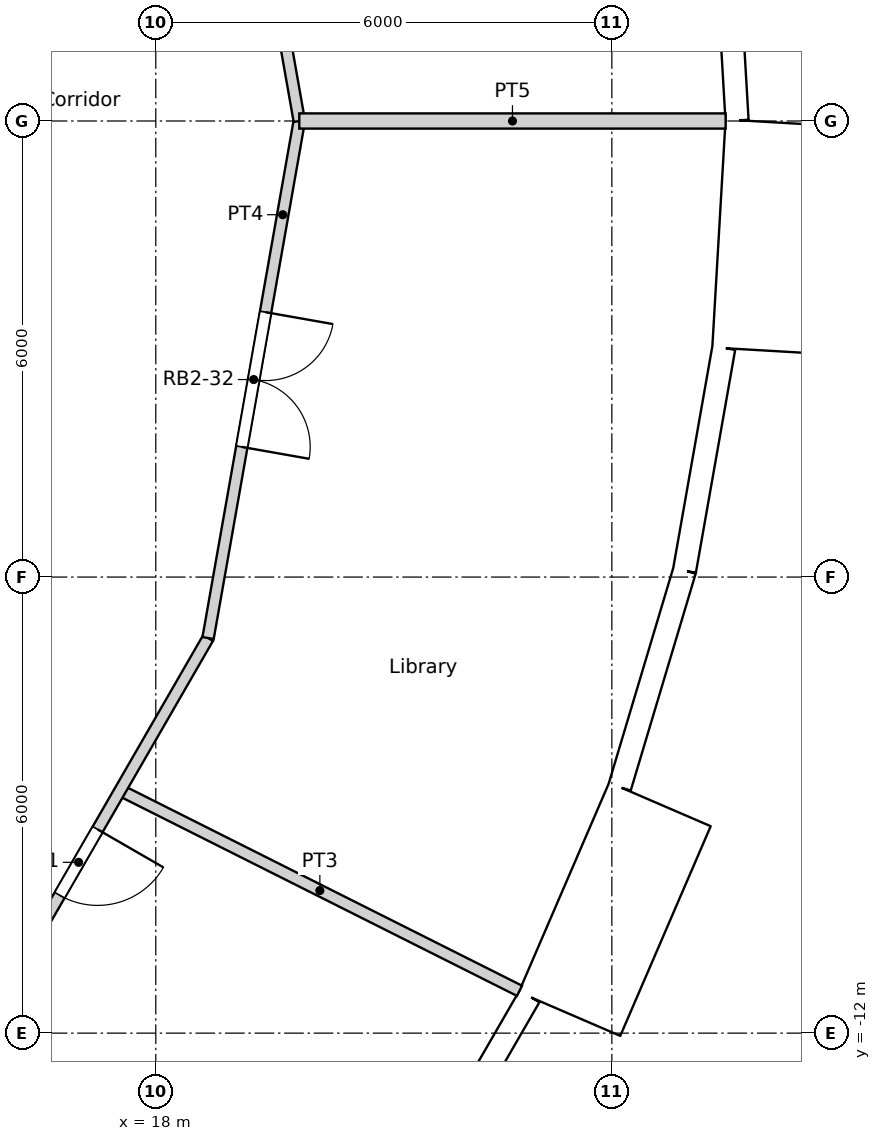
"""IFC4 building model, lengths in metres.
Left out: names, types, materials, properties, quantities, classifications, styles, units other than length and angle.
Written with IfcOpenShell. Run it as: python <this file> out.ifc"""

import sys

from ifc_helpers import new_model, si_unit, direction, frame, frame_2d, origin, origin_2d, place, context, subcontext, project, spatial, rectangle, circle, extrude, element, fill, save


model = new_model("IFC4")
c1 = context("Model", 3, precision=1e-05, world=origin(), true_north=direction((0.0, 1.0)))
c2 = subcontext(c1, "Body", "Model", "MODEL_VIEW")
j1 = project(units=[si_unit("LENGTHUNIT", "METRE"), si_unit("PLANEANGLEUNIT", "RADIAN")], contexts=[c1])
p1 = place(None, origin())
s1 = spatial("IfcSite", under=j1, at=p1, CompositionType="ELEMENT")
p2 = place(p1, origin())
s2 = spatial("IfcBuilding", under=s1, at=p2, CompositionType="ELEMENT")
p3 = place(p2, frame((0.0, 0.0, 136.8)))
s3 = spatial("IfcBuildingStorey", under=s2, at=p3, CompositionType="ELEMENT", Elevation=136.8)
for number, where, z_axis, x_axis in (
    (1, (24.548, 0.0, 0.0), (0.0, 0.0, 1.0), (1.0, 0.0, 0.0)),
    (2, (21.937, -11.017, 0.0), (0.0, 0.0, 1.0), (1.0, 0.0, 0.0)),
    (3, (23.886, -5.661, 0.0), (0.0, 0.0, 1.0), (1.0, 0.0, 0.0)),
):
    element("IfcColumn", number, at=place(p3, frame(where, z_axis=z_axis, x_axis=x_axis)), inside=s3, PredefinedType="COLUMN", context=c2, shape_type="SweptSolid", body=[
        extrude(circle(Radius=0.6, at=origin_2d()), origin(), (0.0, 0.0, 1.0), 3.6),
    ])
for number, where, z_axis, x_axis in (
    (4, (18.822, 0.0, 0.0), (0.0, 0.0, 1.0), (1.0, 0.0, 0.0)),
    (5, (17.986, -5.548, 0.0), (0.0, 0.0, 1.0), (1.0, 0.0, 0.0)),
):
    element("IfcColumn", number, at=place(p3, frame(where, z_axis=z_axis, x_axis=x_axis)), inside=s3, PredefinedType="COLUMN", context=c2, shape_type="SweptSolid", body=[
        extrude(circle(Radius=0.65, at=origin_2d()), origin(), (0.0, 0.0, 1.0), 3.6),
    ])
p4 = place(p3, frame((25.647, 0.01, 0.0), z_axis=(0.0, 0.0, 1.0), x_axis=(-0.058139540521, 0.998308466271, 0.0)))
e6 = element("IfcWall", 6, at=p4, inside=s3, PredefinedType="SOLIDWALL", context=c2, shape_type="SweptSolid", body=[
    extrude(rectangle(XDim=2.973, YDim=0.3, at=frame_2d((1.487, 0.0))), origin(), (0.0, 0.0, 1.0), 2.8),
])
p5 = place(p4, frame((1.486, 0.0, 1.55)))
e7 = element("IfcOpeningElement", 7, at=p5, cuts=e6, PredefinedType="OPENING", context=c2, shape_type="SweptSolid", body=[
    extrude(circle(Radius=0.9, at=origin_2d()), frame((0.0, 0.16, 0.0), z_axis=(0.0, -1.0, 0.0), x_axis=(1.0, 0.0, 0.0)), (0.0, 0.0, 1.0), 0.32),
])
p6 = place(p3, frame((21.428, -14.094, 0.0), z_axis=(0.0, 0.0, 1.0), x_axis=(0.499954672104, 0.866051572276, 0.0)))
e8 = element("IfcWall", 8, at=p6, inside=s3, PredefinedType="SOLIDWALL", context=c2, shape_type="SweptSolid", body=[
    extrude(rectangle(XDim=2.973, YDim=0.3, at=frame_2d((1.486, 0.0))), origin(), (0.0, 0.0, 1.0), 3.3),
])
p7 = place(p6, frame((1.486, 0.0, 1.55)))
e9 = element("IfcOpeningElement", 9, at=p7, cuts=e8, PredefinedType="OPENING", context=c2, shape_type="SweptSolid", body=[
    extrude(circle(Radius=0.9, at=origin_2d()), frame((0.0, 0.16, 0.0), z_axis=(0.0, -1.0, 0.0), x_axis=(1.0, 0.0, 0.0)), (0.0, 0.0, 1.0), 0.32),
])
p8 = place(p3, frame((23.444, -11.746, -0.3), z_axis=(0.0, 0.0, 1.0), x_axis=(0.396079003245, 0.918216435917, 0.0)))
e10 = element("IfcWall", 10, at=p8, inside=s3, PredefinedType="ELEMENTEDWALL", context=c2, shape_type="SweptSolid", body=[
    extrude(rectangle(XDim=3.0, YDim=1.45, at=frame_2d((1.5, 0.0))), origin(), (0.0, 0.0, 1.0), 3.6),
])
p9 = place(p8, frame((1.5, 0.0, 1.85)))
e11 = element("IfcOpeningElement", 11, at=p9, cuts=e10, PredefinedType="OPENING", context=c2, shape_type="SweptSolid", body=[
    extrude(circle(Radius=0.9, at=origin_2d()), frame((0.0, 0.735, 0.0), z_axis=(0.0, -1.0, 0.0), x_axis=(1.0, 0.0, 0.0)), (0.0, 0.0, 1.0), 1.47),
])
p10 = place(p3, frame((24.104, -8.763, 0.0), z_axis=(0.0, 0.0, 1.0), x_axis=(0.286782750849, 0.957995643944, 0.0)))
e12 = element("IfcWall", 12, at=p10, inside=s3, PredefinedType="SOLIDWALL", context=c2, shape_type="SweptSolid", body=[
    extrude(rectangle(XDim=2.973, YDim=0.3, at=frame_2d((1.486, 0.0))), origin(), (0.0, 0.0, 1.0), 2.8),
])
p11 = place(p10, frame((1.486, 0.0, 1.55)))
e13 = element("IfcOpeningElement", 13, at=p11, cuts=e12, PredefinedType="OPENING", context=c2, shape_type="SweptSolid", body=[
    extrude(circle(Radius=0.9, at=origin_2d()), frame((0.0, 0.16, 0.0), z_axis=(0.0, -1.0, 0.0), x_axis=(1.0, 0.0, 0.0)), (0.0, 0.0, 1.0), 0.32),
])
p12 = place(p3, frame((24.956, -5.915, 0.0), z_axis=(0.0, 0.0, 1.0), x_axis=(0.173686952598, 0.984800915159, 0.0)))
e14 = element("IfcWall", 14, at=p12, inside=s3, PredefinedType="SOLIDWALL", context=c2, shape_type="SweptSolid", body=[
    extrude(rectangle(XDim=2.973, YDim=0.3, at=frame_2d((1.486, 0.0))), origin(), (0.0, 0.0, 1.0), 3.3),
])
p13 = place(p12, frame((1.486, 0.0, 1.55)))
e15 = element("IfcOpeningElement", 15, at=p13, cuts=e14, PredefinedType="OPENING", context=c2, shape_type="SweptSolid", body=[
    extrude(circle(Radius=0.9, at=origin_2d()), frame((0.0, 0.16, 0.0), z_axis=(0.0, -1.0, 0.0), x_axis=(1.0, 0.0, 0.0)), (0.0, 0.0, 1.0), 0.32),
])
p14 = place(p3, frame((26.048, -3.02, -0.3), z_axis=(0.0, 0.0, 1.0), x_axis=(0.058106596105, 0.998310384344, 0.0)))
e16 = element("IfcWall", 16, at=p14, inside=s3, PredefinedType="ELEMENTEDWALL", context=c2, shape_type="SweptSolid", body=[
    extrude(rectangle(XDim=3.0, YDim=1.45, at=frame_2d((1.5, 0.0))), origin(), (0.0, 0.0, 1.0), 3.6),
])
p15 = place(p14, frame((1.5, 0.0, 1.85)))
e17 = element("IfcOpeningElement", 17, at=p15, cuts=e16, PredefinedType="OPENING", context=c2, shape_type="SweptSolid", body=[
    extrude(circle(Radius=0.9, at=origin_2d()), frame((0.0, 0.735, 0.0), z_axis=(0.0, -1.0, 0.0), x_axis=(1.0, 0.0, 0.0)), (0.0, 0.0, 1.0), 1.47),
])
p16 = place(p3, frame((18.688, 6.802, 0.0), z_axis=(0.0, 0.0, 1.0), x_axis=(0.173728873845, -0.98479352069, 0.0)))
e18 = element("IfcWall", 18, at=p16, inside=s3, PredefinedType="PARTITIONING", context=c2, shape_type="SweptSolid", body=[
    extrude(rectangle(XDim=6.907, YDim=0.15, at=frame_2d((3.454, 0.0))), origin(), (0.0, 0.0, 1.0), 3.3),
])
p17 = place(p3, frame((15.235, -12.784, 0.0), z_axis=(0.0, 0.0, 1.0), x_axis=(0.499914202267, 0.866074933462, 0.0)))
e19 = element("IfcWall", 19, at=p17, inside=s3, PredefinedType="PARTITIONING", context=c2, shape_type="SweptSolid", body=[
    extrude(rectangle(XDim=6.907, YDim=0.15, at=frame_2d((3.454, 0.0))), origin(), (0.0, 0.0, 1.0), 3.3),
])
p18 = place(p17, frame((3.0, 0.0, 0.0)))
e20 = element("IfcOpeningElement", 20, at=p18, cuts=e19, PredefinedType="OPENING", context=c2, shape_type="SweptSolid", body=[
    extrude(rectangle(XDim=1.0, YDim=2.04, at=frame_2d((0.5, 1.02))), frame((0.0, 0.075, 0.0), z_axis=(0.0, -1.0, 0.0), x_axis=(1.0, 0.0, 0.0)), (0.0, 0.0, 1.0), 0.15),
])
p19 = place(p3, frame((18.688, -6.802, 0.0), z_axis=(0.0, 0.0, 1.0), x_axis=(0.173728873845, 0.98479352069, 0.0)))
e21 = element("IfcWall", 21, at=p19, inside=s3, PredefinedType="PARTITIONING", context=c2, shape_type="SweptSolid", body=[
    extrude(rectangle(XDim=6.907, YDim=0.15, at=frame_2d((3.454, 0.0))), origin(), (0.0, 0.0, 1.0), 3.3),
])
p20 = place(p19, frame((2.553, 0.0, 0.0)))
e22 = element("IfcOpeningElement", 22, at=p20, cuts=e21, PredefinedType="OPENING", context=c2, shape_type="SweptSolid", body=[
    extrude(rectangle(XDim=1.8, YDim=2.1, at=frame_2d((0.9, 1.05))), frame((0.0, 0.075, 0.0), z_axis=(0.0, -1.0, 0.0), x_axis=(1.0, 0.0, 0.0)), (0.0, 0.0, 1.0), 0.15),
])
p21 = place(p3, frame((19.888, 0.0, 0.0), z_axis=(0.0, 0.0, 1.0), x_axis=(1.0, 0.0, 0.0)))
e23 = element("IfcWall", 23, at=p21, inside=s3, PredefinedType="PARTITIONING", context=c2, shape_type="SweptSolid", body=[
    extrude(rectangle(XDim=5.609, YDim=0.2, at=frame_2d((2.805, 0.0))), origin(), (0.0, 0.0, 1.0), 3.3),
])
p22 = place(p3, frame((17.532, -8.805, 0.0), z_axis=(0.0, 0.0, 1.0), x_axis=(0.893628331628, -0.448807759415, 0.0)))
e24 = element("IfcWall", 24, at=p22, inside=s3, PredefinedType="PARTITIONING", context=c2, shape_type="SweptSolid", body=[
    extrude(rectangle(XDim=5.878, YDim=0.15, at=frame_2d((2.939, 0.0))), origin(), (0.0, 0.0, 1.0), 3.3),
])
p23 = place(p5, origin())
e25 = element("IfcWindow", 25, at=p23, inside=s3, PartitioningType="SINGLE_PANEL", PredefinedType="WINDOW", context=c2, shape_type="SweptSolid", body=[
    extrude(circle(Radius=0.9, at=origin_2d()), frame((0.0, 0.12, 0.0), z_axis=(0.0, -1.0, 0.0), x_axis=(1.0, 0.0, 0.0)), (0.0, 0.0, 1.0), 0.1),
])
fill(e7, e25)
p24 = place(p7, origin())
e26 = element("IfcWindow", 26, at=p24, inside=s3, PartitioningType="SINGLE_PANEL", PredefinedType="WINDOW", context=c2, shape_type="SweptSolid", body=[
    extrude(circle(Radius=0.9, at=origin_2d()), frame((0.0, 0.12, 0.0), z_axis=(0.0, -1.0, 0.0), x_axis=(1.0, 0.0, 0.0)), (0.0, 0.0, 1.0), 0.1),
])
fill(e9, e26)
p25 = place(p9, origin())
e27 = element("IfcWindow", 27, at=p25, inside=s3, PartitioningType="SINGLE_PANEL", PredefinedType="WINDOW", context=c2, shape_type="SweptSolid", body=[
    extrude(circle(Radius=0.9, at=origin_2d()), frame((0.0, 0.695, 0.0), z_axis=(0.0, -1.0, 0.0), x_axis=(1.0, 0.0, 0.0)), (0.0, 0.0, 1.0), 0.1),
])
fill(e11, e27)
p26 = place(p11, origin())
e28 = element("IfcWindow", 28, at=p26, inside=s3, PartitioningType="SINGLE_PANEL", PredefinedType="WINDOW", context=c2, shape_type="SweptSolid", body=[
    extrude(circle(Radius=0.9, at=origin_2d()), frame((0.0, 0.12, 0.0), z_axis=(0.0, -1.0, 0.0), x_axis=(1.0, 0.0, 0.0)), (0.0, 0.0, 1.0), 0.1),
])
fill(e13, e28)
p27 = place(p13, origin())
e29 = element("IfcWindow", 29, at=p27, inside=s3, PartitioningType="SINGLE_PANEL", PredefinedType="WINDOW", context=c2, shape_type="SweptSolid", body=[
    extrude(circle(Radius=0.9, at=origin_2d()), frame((0.0, 0.12, 0.0), z_axis=(0.0, -1.0, 0.0), x_axis=(1.0, 0.0, 0.0)), (0.0, 0.0, 1.0), 0.1),
])
fill(e15, e29)
p28 = place(p15, origin())
e30 = element("IfcWindow", 30, at=p28, inside=s3, PartitioningType="SINGLE_PANEL", PredefinedType="WINDOW", context=c2, shape_type="SweptSolid", body=[
    extrude(circle(Radius=0.9, at=origin_2d()), frame((0.0, 0.695, 0.0), z_axis=(0.0, -1.0, 0.0), x_axis=(1.0, 0.0, 0.0)), (0.0, 0.0, 1.0), 0.1),
])
fill(e17, e30)
p29 = place(p18, origin())
e31 = element("IfcDoor", 31, at=p29, inside=s3, OperationType="SINGLE_SWING_LEFT", PredefinedType="DOOR", context=c2, shape_type="SweptSolid", body=[
    extrude(rectangle(XDim=1.0, YDim=2.04, at=frame_2d((0.5, 1.02))), frame((0.0, 0.025, 0.0), z_axis=(0.0, -1.0, 0.0), x_axis=(1.0, 0.0, 0.0)), (0.0, 0.0, 1.0), 0.05),
])
fill(e20, e31)
p30 = place(p20, origin())
e32 = element("IfcDoor", 32, at=p30, inside=s3, OperationType="DOUBLE_DOOR_SINGLE_SWING", PredefinedType="DOOR", context=c2, shape_type="SweptSolid", body=[
    extrude(rectangle(XDim=1.8, YDim=2.1, at=frame_2d((0.9, 1.05))), frame((0.0, 0.025, 0.0), z_axis=(0.0, -1.0, 0.0), x_axis=(1.0, 0.0, 0.0)), (0.0, 0.0, 1.0), 0.05),
])
fill(e22, e32)
save(model, sys.argv[1])
